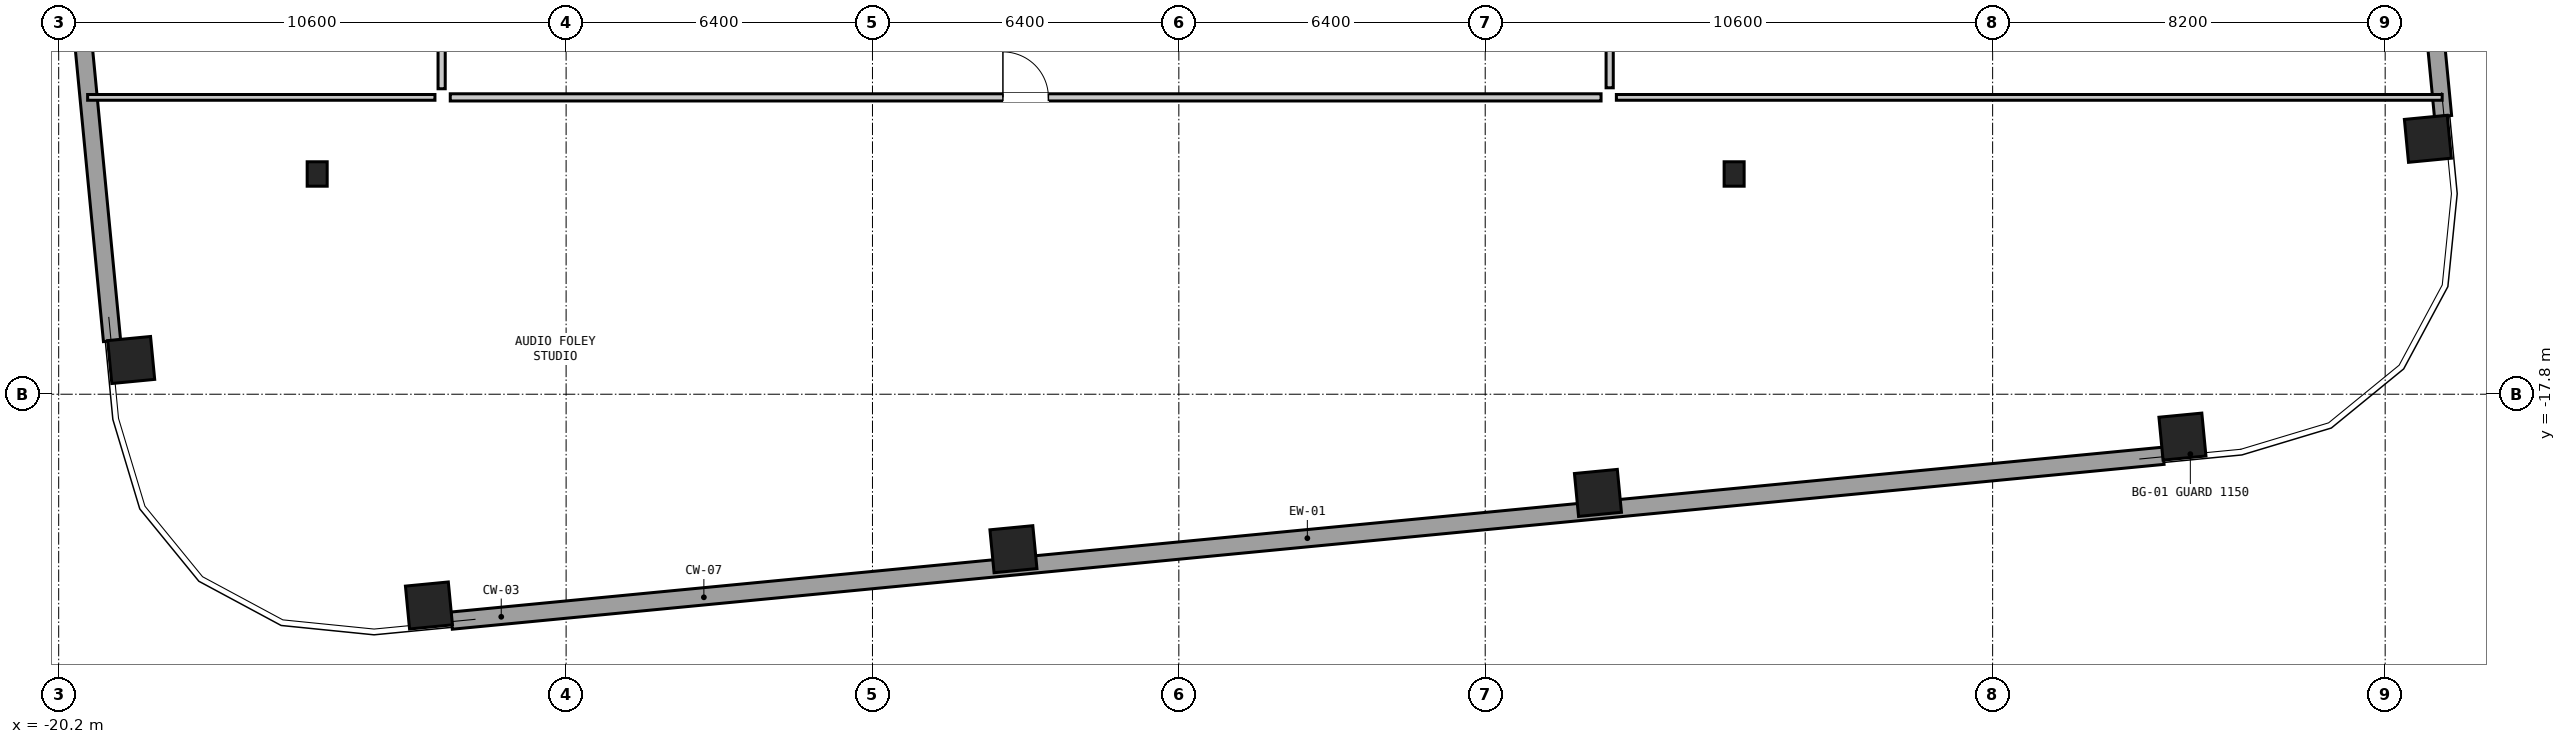
"""IFC4 building model, lengths in metres.
Left out: names, types, materials, properties, quantities, classifications, styles, units other than length and angle.
Written with IfcOpenShell. Run it as: python <this file> out.ifc"""

import sys

from ifc_helpers import new_model, si_unit, direction, frame, frame_2d, origin, origin_2d, place, context, subcontext, project, spatial, rectangle, hollow_rectangle, i_section, extrude, element, fill, save


model = new_model("IFC4")
c1 = context("Model", 3, precision=1e-05, world=origin(), true_north=direction((0.0, 1.0)))
c2 = subcontext(c1, "Body", "Model", "MODEL_VIEW")
j1 = project(units=[si_unit("LENGTHUNIT", "METRE"), si_unit("PLANEANGLEUNIT", "RADIAN")], contexts=[c1])
p1 = place(None, origin())
s1 = spatial("IfcSite", under=j1, at=p1, CompositionType="ELEMENT")
p2 = place(p1, origin())
s2 = spatial("IfcBuilding", under=s1, at=p2, CompositionType="ELEMENT")
p3 = place(p2, frame((0.0, 0.0, 69.45)))
s3 = spatial("IfcBuildingStorey", under=s2, at=p3, CompositionType="ELEMENT", Elevation=69.45)
for number, where, z_axis, x_axis in (
    (1, (-12.465, -22.213, 0.0), (0.0, 0.0, 1.0), (0.995, 0.096, 0.0)),
    (2, (-0.255, -21.037, 0.0), (0.0, 0.0, 1.0), (0.995, 0.096, 0.0)),
    (3, (11.955, -19.861, 0.0), (0.0, 0.0, 1.0), (0.995, 0.096, 0.0)),
    (4, (24.165, -18.686, 0.0), (0.0, 0.0, 1.0), (0.995, 0.096, 0.0)),
    (5, (29.292, -12.465, 0.0), (0.0, 0.0, 1.0), (-0.096, 0.995, 0.0)),
    (6, (-18.686, -17.085, 0.0), (0.0, 0.0, 1.0), (-0.096, 0.995, 0.0)),
):
    element("IfcColumn", number, at=place(p3, frame(where, z_axis=z_axis, x_axis=x_axis)), inside=s3, PredefinedType="COLUMN", context=c2, shape_type="SweptSolid", body=[
        extrude(hollow_rectangle(XDim=0.9, YDim=0.9, WallThickness=0.055, at=origin_2d()), origin(), (0.0, 0.0, 1.0), 3.05),
    ])
for number, where, z_axis, x_axis in (
    (7, (-14.8, -13.2, 0.0), (0.0, 0.0, 1.0), (1.0, 0.0, 0.0)),
    (8, (14.8, -13.2, 0.0), (0.0, 0.0, 1.0), (1.0, 0.0, 0.0)),
):
    element("IfcColumn", number, at=place(p3, frame(where, z_axis=z_axis, x_axis=x_axis)), inside=s3, PredefinedType="COLUMN", context=c2, shape_type="SweptSolid", body=[
        extrude(i_section(OverallWidth=0.418, OverallDepth=0.51, WebThickness=0.042, FlangeThickness=0.068, at=origin_2d()), origin(), (0.0, 0.0, 1.0), 3.05),
    ])
p4 = place(p3, frame((23.764, -19.086, 0.0), z_axis=(0.0, 0.0, 1.0), x_axis=(-0.99539565892, -0.095851354731, 0.0)))
e9 = element("IfcWall", 9, at=p4, inside=s3, PredefinedType="SOLIDWALL", context=c2, shape_type="SweptSolid", body=[
    extrude(rectangle(XDim=35.924, YDim=0.36, at=frame_2d((17.962, 0.0))), origin(), (0.0, 0.0, 1.0), 0.48),
])
p5 = place(p3, frame((26.166, 23.764, 0.0), z_axis=(0.0, 0.0, 1.0), x_axis=(0.095844621123, -0.995396307308, 0.0)))
e10 = element("IfcWall", 10, at=p5, inside=s3, PredefinedType="SOLIDWALL", context=c2, shape_type="SweptSolid", body=[
    extrude(rectangle(XDim=35.924, YDim=0.36, at=frame_2d((17.962, 0.0))), origin(), (0.0, 0.0, 1.0), 0.48),
])
p6 = place(p3, frame((-19.086, -16.684, 0.0), z_axis=(0.0, 0.0, 1.0), x_axis=(-0.095851354731, 0.99539565892, 0.0)))
e11 = element("IfcWall", 11, at=p6, inside=s3, PredefinedType="SOLIDWALL", context=c2, shape_type="SweptSolid", body=[
    extrude(rectangle(XDim=35.924, YDim=0.36, at=frame_2d((17.962, 0.0))), origin(), (0.0, 0.0, 1.0), 0.48),
])
p7 = place(p3, frame((-19.595, -11.6, 0.0), z_axis=(0.0, 0.0, 1.0), x_axis=(1.0, 0.0, 0.0)))
e12 = element("IfcWall", 12, at=p7, inside=s3, PredefinedType="PARTITIONING", context=c2, shape_type="SweptSolid", body=[
    extrude(rectangle(XDim=7.255, YDim=0.12, at=frame_2d((3.628, 0.0))), origin(), (0.0, 0.0, 1.0), 2.274),
])
p8 = place(p3, frame((12.34, -11.6, 0.0), z_axis=(0.0, 0.0, 1.0), x_axis=(1.0, 0.0, 0.0)))
e13 = element("IfcWall", 13, at=p8, inside=s3, PredefinedType="PARTITIONING", context=c2, shape_type="SweptSolid", body=[
    extrude(rectangle(XDim=17.251, YDim=0.12, at=frame_2d((8.625, 0.0))), origin(), (0.0, 0.0, 1.0), 2.274),
])
p9 = place(p3, frame((-12.02, -11.6, 0.0), z_axis=(0.0, 0.0, 1.0), x_axis=(1.0, 0.0, 0.0)))
e14 = element("IfcWall", 14, at=p9, inside=s3, PredefinedType="PARTITIONING", context=c2, shape_type="SweptSolid", body=[
    extrude(rectangle(XDim=24.04, YDim=0.15, at=frame_2d((12.02, 0.0))), origin(), (0.0, 0.0, 1.0), 2.274),
])
p10 = place(p9, frame((11.545, 0.0, 0.0)))
e15 = element("IfcOpeningElement", 15, at=p10, cuts=e14, PredefinedType="OPENING", context=c2, shape_type="SweptSolid", body=[
    extrude(rectangle(XDim=0.95, YDim=2.1, at=frame_2d((0.475, 1.05))), frame((0.0, 0.087, 0.0), z_axis=(0.0, -1.0, 0.0), x_axis=(1.0, 0.0, 0.0)), (0.0, 0.0, 1.0), 0.174),
])
p11 = place(p3, frame((-12.2, -11.42, 0.0), z_axis=(0.0, 0.0, 1.0), x_axis=(0.0, 1.0, 0.0)))
e16 = element("IfcWall", 16, at=p11, inside=s3, PredefinedType="PARTITIONING", context=c2, shape_type="SweptSolid", body=[
    extrude(rectangle(XDim=24.04, YDim=0.15, at=frame_2d((12.02, 0.0))), origin(), (0.0, 0.0, 1.0), 2.83),
])
p12 = place(p11, frame((11.545, 0.0, 0.0)))
e17 = element("IfcOpeningElement", 17, at=p12, cuts=e16, PredefinedType="OPENING", context=c2, shape_type="SweptSolid", body=[
    extrude(rectangle(XDim=0.95, YDim=2.1, at=frame_2d((0.475, 1.05))), frame((0.0, 0.087, 0.0), z_axis=(0.0, -1.0, 0.0), x_axis=(1.0, 0.0, 0.0)), (0.0, 0.0, 1.0), 0.174),
])
p13 = place(p3, frame((12.2, -11.4, 0.0), z_axis=(0.0, 0.0, 1.0), x_axis=(0.0, 1.0, 0.0)))
e18 = element("IfcWall", 18, at=p13, inside=s3, PredefinedType="PARTITIONING", context=c2, shape_type="SweptSolid", body=[
    extrude(rectangle(XDim=8.84, YDim=0.15, at=frame_2d((4.42, 0.0))), origin(), (0.0, 0.0, 1.0), 2.83),
])
p14 = place(p13, frame((3.945, 0.0, 0.0)))
e19 = element("IfcOpeningElement", 19, at=p14, cuts=e18, PredefinedType="OPENING", context=c2, shape_type="SweptSolid", body=[
    extrude(rectangle(XDim=0.95, YDim=2.1, at=frame_2d((0.475, 1.05))), frame((0.0, 0.087, 0.0), z_axis=(0.0, -1.0, 0.0), x_axis=(1.0, 0.0, 0.0)), (0.0, 0.0, 1.0), 0.174),
])
p15 = place(p10, origin())
e20 = element("IfcDoor", 20, at=p15, inside=s3, OperationType="SINGLE_SWING_LEFT", PredefinedType="DOOR", context=c2, shape_type="SweptSolid", body=[
    extrude(rectangle(XDim=0.95, YDim=2.1, at=frame_2d((0.475, 1.05))), frame((0.0, 0.025, 0.0), z_axis=(0.0, -1.0, 0.0), x_axis=(1.0, 0.0, 0.0)), (0.0, 0.0, 1.0), 0.05),
])
fill(e15, e20)
save(model, sys.argv[1])
